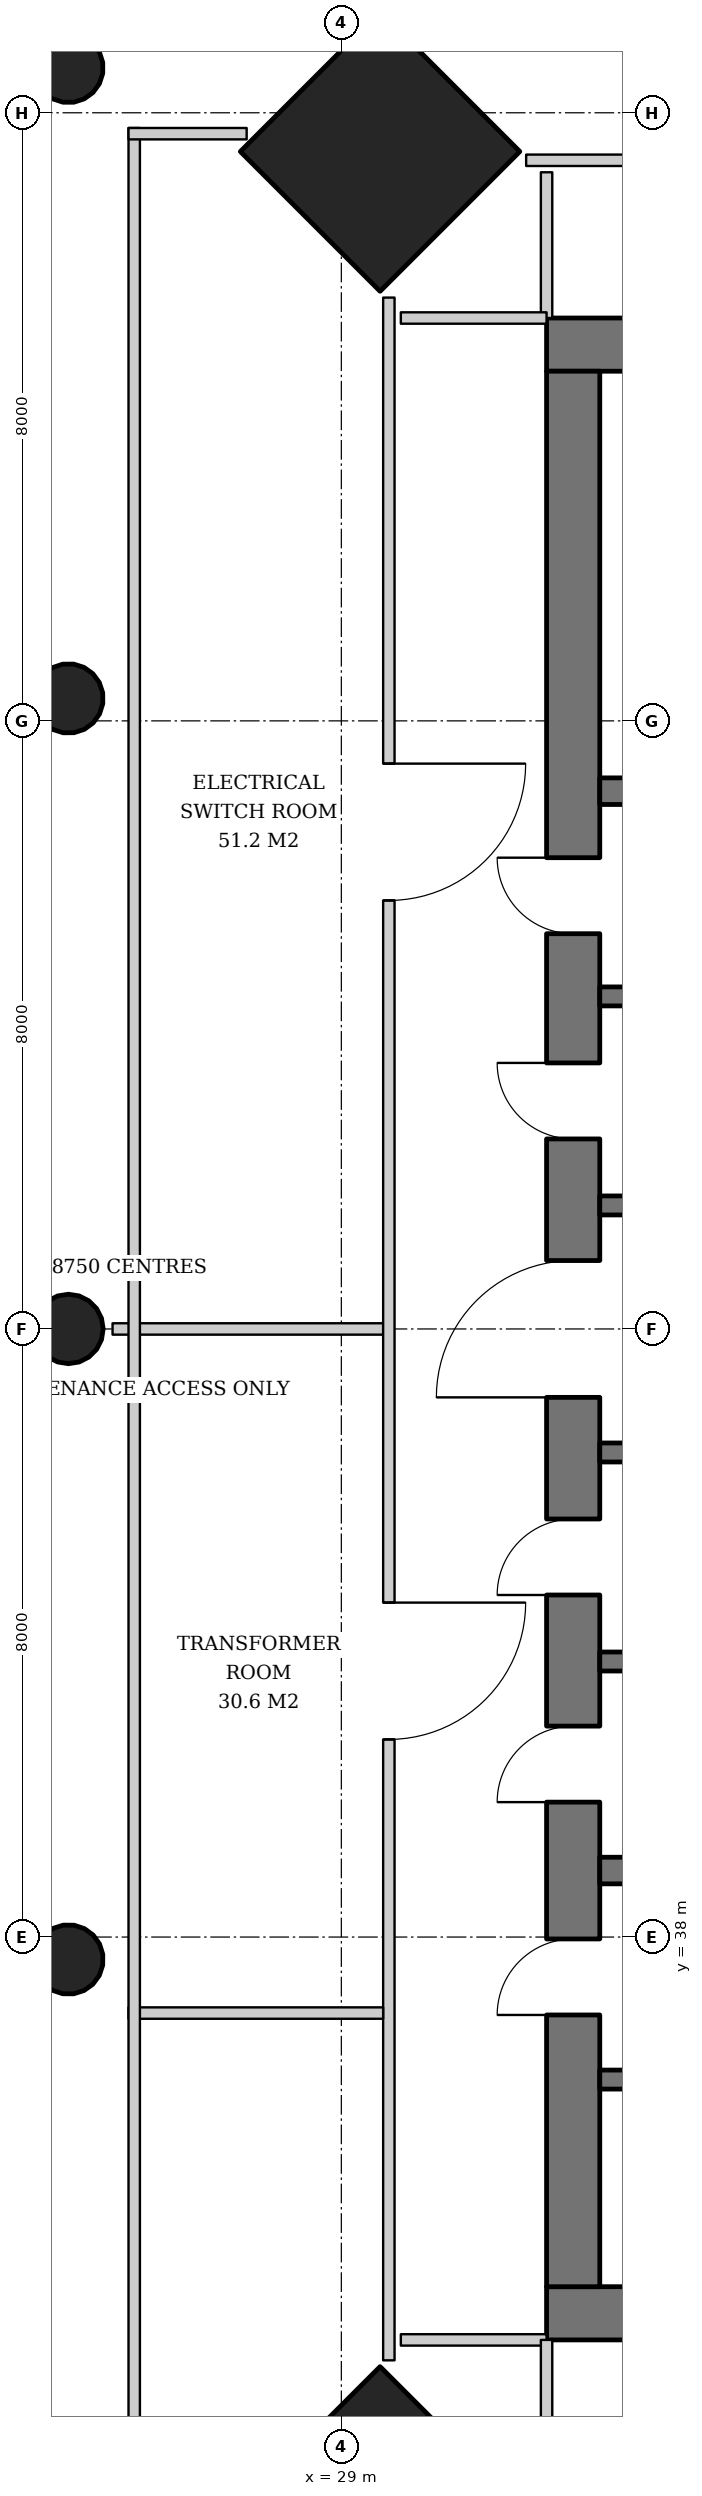
"""IFC4 building model, lengths in metres.
Left out: names, types, materials, properties, quantities, classifications, styles, units other than length and angle.
Written with IfcOpenShell. Run it as: python <this file> out.ifc"""

import sys

from ifc_helpers import new_model, si_unit, direction, frame, frame_2d, origin, origin_2d, place, context, subcontext, project, spatial, rectangle, hollow_circle, extrude, element, fill, save


model = new_model("IFC4")
c1 = context("Model", 3, precision=1e-05, world=origin(), true_north=direction((0.0, 1.0)))
c2 = subcontext(c1, "Body", "Model", "MODEL_VIEW")
j1 = project(units=[si_unit("LENGTHUNIT", "METRE"), si_unit("PLANEANGLEUNIT", "RADIAN")], contexts=[c1])
p1 = place(None, origin())
s1 = spatial("IfcSite", under=j1, at=p1, CompositionType="ELEMENT")
p2 = place(p1, origin())
s2 = spatial("IfcBuilding", under=s1, at=p2, CompositionType="ELEMENT")
p3 = place(p2, frame((0.0, 0.0, 157.8)))
s3 = spatial("IfcBuildingStorey", under=s2, at=p3, CompositionType="ELEMENT", Elevation=157.8)
for number, where, z_axis, x_axis in (
    (1, (29.471, 61.529, 0.0), (0.032, -0.032, 0.999), (0.707, 0.707, 0.0)),
    (2, (29.471, 30.471, 0.0), (0.032, 0.032, 0.999), (-0.707, 0.707, 0.0)),
):
    element("IfcColumn", number, at=place(p3, frame(where, z_axis=z_axis, x_axis=x_axis)), inside=s3, PredefinedType="COLUMN", context=c2, shape_type="SweptSolid", body=[
        extrude(rectangle(XDim=2.6, YDim=2.6, at=origin_2d()), origin(), (0.0, 0.0, 1.0), 3.804),
    ])
p4 = place(p3, frame((25.371, 62.629, 0.0), z_axis=(0.031962158256, -0.031962158256, 0.998977898093), x_axis=(0.707106781187, 0.707106781187, 0.0)))
e3 = element("IfcColumn", 3, at=p4, inside=s3, PredefinedType="COLUMN", context=c2, shape_type="SweptSolid", body=[
    extrude(hollow_circle(Radius=0.457, WallThickness=0.03, at=origin_2d()), origin(), (0.0, 0.0, 1.0), 3.804),
])
p5 = place(p3, frame((25.371, 54.314, 0.0), z_axis=(0.031974442509, -0.015923015547, 0.999361842679), x_axis=(0.445775033553, 0.895145027055, 0.0)))
e4 = element("IfcColumn", 4, at=p5, inside=s3, PredefinedType="COLUMN", context=c2, shape_type="SweptSolid", body=[
    extrude(hollow_circle(Radius=0.457, WallThickness=0.03, at=origin_2d()), origin(), (0.0, 0.0, 1.0), 3.802),
])
p6 = place(p3, frame((25.371, 46.0, 0.0), z_axis=(0.031978496719, 0.0, 0.999488557087), x_axis=(0.0, 1.0, 0.0)))
e5 = element("IfcColumn", 5, at=p6, inside=s3, PredefinedType="COLUMN", context=c2, shape_type="SweptSolid", body=[
    extrude(hollow_circle(Radius=0.457, WallThickness=0.03, at=origin_2d()), origin(), (0.0, 0.0, 1.0), 3.802),
])
p7 = place(p3, frame((25.371, 37.686, 0.0), z_axis=(0.031974442509, 0.015923015547, 0.999361842679), x_axis=(-0.445775033553, 0.895145027055, 0.0)))
e6 = element("IfcColumn", 6, at=p7, inside=s3, PredefinedType="COLUMN", context=c2, shape_type="SweptSolid", body=[
    extrude(hollow_circle(Radius=0.457, WallThickness=0.03, at=origin_2d()), origin(), (0.0, 0.0, 1.0), 3.802),
])
p8 = place(p3, frame((31.7, 33.05, 0.0), z_axis=(0.0, 0.0, 1.0), x_axis=(1.0, 0.0, 0.0)))
e7 = element("IfcWall", 7, at=p8, inside=s3, PredefinedType="SHEAR", context=c2, shape_type="SweptSolid", body=[
    extrude(rectangle(XDim=26.6, YDim=0.7, at=frame_2d((13.3, 0.0))), origin(), (0.0, 0.0, 1.0), 3.8),
])
p9 = place(p8, frame((7.3, 0.0, 0.0)))
e8 = element("IfcOpeningElement", 8, at=p9, cuts=e7, PredefinedType="OPENING", context=c2, shape_type="SweptSolid", body=[
    extrude(rectangle(XDim=1.0, YDim=2.1, at=frame_2d((0.5, 1.05))), frame((0.0, 0.36, 0.0), z_axis=(0.0, -1.0, 0.0), x_axis=(1.0, 0.0, 0.0)), (0.0, 0.0, 1.0), 0.72),
])
p10 = place(p8, frame((18.75, 0.0, 0.0)))
e9 = element("IfcOpeningElement", 9, at=p10, cuts=e7, PredefinedType="OPENING", context=c2, shape_type="SweptSolid", body=[
    extrude(rectangle(XDim=1.0, YDim=2.1, at=frame_2d((0.5, 1.05))), frame((0.0, 0.36, 0.0), z_axis=(0.0, -1.0, 0.0), x_axis=(1.0, 0.0, 0.0)), (0.0, 0.0, 1.0), 0.72),
])
p11 = place(p8, frame((1.85, 0.0, 0.0)))
e10 = element("IfcOpeningElement", 10, at=p11, cuts=e7, PredefinedType="OPENING", context=c2, shape_type="SweptSolid", body=[
    extrude(rectangle(XDim=1.0, YDim=2.1, at=frame_2d((0.5, 1.05))), frame((0.0, 0.36, 0.0), z_axis=(0.0, -1.0, 0.0), x_axis=(1.0, 0.0, 0.0)), (0.0, 0.0, 1.0), 0.72),
])
p12 = place(p8, frame((4.7, 0.0, 0.0)))
e11 = element("IfcOpeningElement", 11, at=p12, cuts=e7, PredefinedType="OPENING", context=c2, shape_type="SweptSolid", body=[
    extrude(rectangle(XDim=1.0, YDim=2.1, at=frame_2d((0.5, 1.05))), frame((0.0, 0.36, 0.0), z_axis=(0.0, -1.0, 0.0), x_axis=(1.0, 0.0, 0.0)), (0.0, 0.0, 1.0), 0.72),
])
p13 = place(p3, frame((31.7, 58.95, 0.0), z_axis=(0.0, 0.0, 1.0), x_axis=(1.0, 0.0, 0.0)))
e12 = element("IfcWall", 12, at=p13, inside=s3, PredefinedType="SHEAR", context=c2, shape_type="SweptSolid", body=[
    extrude(rectangle(XDim=26.6, YDim=0.7, at=frame_2d((13.3, 0.0))), origin(), (0.0, 0.0, 1.0), 3.8),
])
p14 = place(p13, frame((17.94, 0.0, 0.0)))
e13 = element("IfcOpeningElement", 13, at=p14, cuts=e12, PredefinedType="OPENING", context=c2, shape_type="SweptSolid", body=[
    extrude(rectangle(XDim=1.0, YDim=2.1, at=frame_2d((0.5, 1.05))), frame((0.0, 0.36, 0.0), z_axis=(0.0, -1.0, 0.0), x_axis=(1.0, 0.0, 0.0)), (0.0, 0.0, 1.0), 0.72),
])
p15 = place(p13, frame((5.825, 0.0, 0.0)))
e14 = element("IfcOpeningElement", 14, at=p15, cuts=e12, PredefinedType="OPENING", context=c2, shape_type="SweptSolid", body=[
    extrude(rectangle(XDim=1.0, YDim=2.1, at=frame_2d((0.5, 1.05))), frame((0.0, 0.36, 0.0), z_axis=(0.0, -1.0, 0.0), x_axis=(1.0, 0.0, 0.0)), (0.0, 0.0, 1.0), 0.72),
])
p16 = place(p13, frame((2.587, 0.0, 0.0)))
e15 = element("IfcOpeningElement", 15, at=p16, cuts=e12, PredefinedType="OPENING", context=c2, shape_type="SweptSolid", body=[
    extrude(rectangle(XDim=1.0, YDim=2.1, at=frame_2d((0.5, 1.05))), frame((0.0, 0.36, 0.0), z_axis=(0.0, -1.0, 0.0), x_axis=(1.0, 0.0, 0.0)), (0.0, 0.0, 1.0), 0.72),
])
p17 = place(p3, frame((32.05, 33.4, 0.0), z_axis=(0.0, 0.0, 1.0), x_axis=(0.0, 1.0, 0.0)))
e16 = element("IfcWall", 16, at=p17, inside=s3, PredefinedType="SHEAR", context=c2, shape_type="SweptSolid", body=[
    extrude(rectangle(XDim=25.2, YDim=0.7, at=frame_2d((12.6, 0.0))), origin(), (0.0, 0.0, 1.0), 3.8),
])
p18 = place(p17, frame((11.7, 0.0, 0.0)))
e17 = element("IfcOpeningElement", 17, at=p18, cuts=e16, PredefinedType="OPENING", context=c2, shape_type="SweptSolid", body=[
    extrude(rectangle(XDim=1.8, YDim=2.4, at=frame_2d((0.9, 1.2))), frame((0.0, 0.36, 0.0), z_axis=(0.0, -1.0, 0.0), x_axis=(1.0, 0.0, 0.0)), (0.0, 0.0, 1.0), 0.72),
])
p19 = place(p17, frame((3.575, 0.0, 0.0)))
e18 = element("IfcOpeningElement", 18, at=p19, cuts=e16, PredefinedType="OPENING", context=c2, shape_type="SweptSolid", body=[
    extrude(rectangle(XDim=1.0, YDim=2.1, at=frame_2d((0.5, 1.05))), frame((0.0, 0.36, 0.0), z_axis=(0.0, -1.0, 0.0), x_axis=(1.0, 0.0, 0.0)), (0.0, 0.0, 1.0), 0.72),
])
p20 = place(p17, frame((6.375, 0.0, 0.0)))
e19 = element("IfcOpeningElement", 19, at=p20, cuts=e16, PredefinedType="OPENING", context=c2, shape_type="SweptSolid", body=[
    extrude(rectangle(XDim=1.0, YDim=2.1, at=frame_2d((0.5, 1.05))), frame((0.0, 0.36, 0.0), z_axis=(0.0, -1.0, 0.0), x_axis=(1.0, 0.0, 0.0)), (0.0, 0.0, 1.0), 0.72),
])
p21 = place(p17, frame((9.1, 0.0, 0.0)))
e20 = element("IfcOpeningElement", 20, at=p21, cuts=e16, PredefinedType="OPENING", context=c2, shape_type="SweptSolid", body=[
    extrude(rectangle(XDim=1.0, YDim=2.1, at=frame_2d((0.5, 1.05))), frame((0.0, 0.36, 0.0), z_axis=(0.0, -1.0, 0.0), x_axis=(1.0, 0.0, 0.0)), (0.0, 0.0, 1.0), 0.72),
])
p22 = place(p17, frame((15.1, 0.0, 0.0)))
e21 = element("IfcOpeningElement", 21, at=p22, cuts=e16, PredefinedType="OPENING", context=c2, shape_type="SweptSolid", body=[
    extrude(rectangle(XDim=1.0, YDim=2.1, at=frame_2d((0.5, 1.05))), frame((0.0, 0.36, 0.0), z_axis=(0.0, -1.0, 0.0), x_axis=(1.0, 0.0, 0.0)), (0.0, 0.0, 1.0), 0.72),
])
p23 = place(p17, frame((17.8, 0.0, 0.0)))
e22 = element("IfcOpeningElement", 22, at=p23, cuts=e16, PredefinedType="OPENING", context=c2, shape_type="SweptSolid", body=[
    extrude(rectangle(XDim=1.0, YDim=2.1, at=frame_2d((0.5, 1.05))), frame((0.0, 0.36, 0.0), z_axis=(0.0, -1.0, 0.0), x_axis=(1.0, 0.0, 0.0)), (0.0, 0.0, 1.0), 0.72),
])
p24 = place(p3, frame((32.4, 36.125, 0.0), z_axis=(0.0, 0.0, 1.0), x_axis=(1.0, 0.0, 0.0)))
e23 = element("IfcWall", 23, at=p24, inside=s3, PredefinedType="SHEAR", context=c2, shape_type="SweptSolid", body=[
    extrude(rectangle(XDim=2.7, YDim=0.25, at=frame_2d((1.35, 0.0))), origin(), (0.0, 0.0, 1.0), 3.8),
])
p25 = place(p3, frame((32.4, 38.875, 0.0), z_axis=(0.0, 0.0, 1.0), x_axis=(1.0, 0.0, 0.0)))
e24 = element("IfcWall", 24, at=p25, inside=s3, PredefinedType="SHEAR", context=c2, shape_type="SweptSolid", body=[
    extrude(rectangle(XDim=2.7, YDim=0.35, at=frame_2d((1.35, 0.0))), origin(), (0.0, 0.0, 1.0), 3.8),
])
for number, where, z_axis, x_axis in (
    (25, (32.4, 41.625, 0.0), (0.0, 0.0, 1.0), (1.0, 0.0, 0.0)),
    (26, (32.4, 44.375, 0.0), (0.0, 0.0, 1.0), (1.0, 0.0, 0.0)),
    (27, (32.4, 47.625, 0.0), (0.0, 0.0, 1.0), (1.0, 0.0, 0.0)),
    (28, (32.4, 50.375, 0.0), (0.0, 0.0, 1.0), (1.0, 0.0, 0.0)),
):
    element("IfcWall", number, at=place(p3, frame(where, z_axis=z_axis, x_axis=x_axis)), inside=s3, PredefinedType="SHEAR", context=c2, shape_type="SweptSolid", body=[
        extrude(rectangle(XDim=2.7, YDim=0.25, at=frame_2d((1.35, 0.0))), origin(), (0.0, 0.0, 1.0), 3.8),
    ])
p26 = place(p3, frame((32.4, 53.075, 0.0), z_axis=(0.0, 0.0, 1.0), x_axis=(1.0, 0.0, 0.0)))
e29 = element("IfcWall", 29, at=p26, inside=s3, PredefinedType="SHEAR", context=c2, shape_type="SweptSolid", body=[
    extrude(rectangle(XDim=2.7, YDim=0.35, at=frame_2d((1.35, 0.0))), origin(), (0.0, 0.0, 1.0), 3.8),
])
p27 = place(p3, frame((31.7, 59.3, 0.0), z_axis=(0.0, 0.0, 1.0), x_axis=(0.0, 1.0, 0.0)))
e30 = element("IfcWall", 30, at=p27, inside=s3, PredefinedType="PARTITIONING", context=c2, shape_type="SweptSolid", body=[
    extrude(rectangle(XDim=1.917, YDim=0.15, at=frame_2d((0.958, 0.0))), origin(), (0.0, 0.0, 1.0), 3.52),
])
p28 = place(p3, frame((58.569, 61.375, 0.0), z_axis=(0.0, 0.0, 1.0), x_axis=(-1.0, 0.0, 0.0)))
e31 = element("IfcWall", 31, at=p28, inside=s3, PredefinedType="SOLIDWALL", context=c2, shape_type="SweptSolid", body=[
    extrude(rectangle(XDim=27.137, YDim=0.15, at=frame_2d((13.569, 0.0))), origin(), (0.0, 0.0, 1.0), 2.706),
])
p29 = place(p28, frame((6.131, 0.0, 0.0)))
e32 = element("IfcOpeningElement", 32, at=p29, cuts=e31, PredefinedType="OPENING", context=c2, shape_type="SweptSolid", body=[
    extrude(rectangle(XDim=1.8, YDim=2.4, at=frame_2d((0.9, 1.2))), frame((0.0, 0.085, 0.0), z_axis=(0.0, -1.0, 0.0), x_axis=(1.0, 0.0, 0.0)), (0.0, 0.0, 1.0), 0.17),
])
p30 = place(p28, frame((17.169, 0.0, 0.0)))
e33 = element("IfcOpeningElement", 33, at=p30, cuts=e31, PredefinedType="OPENING", context=c2, shape_type="SweptSolid", body=[
    extrude(rectangle(XDim=1.8, YDim=2.4, at=frame_2d((0.9, 1.2))), frame((0.0, 0.085, 0.0), z_axis=(0.0, -1.0, 0.0), x_axis=(1.0, 0.0, 0.0)), (0.0, 0.0, 1.0), 0.17),
])
for number, where, z_axis, x_axis in (
    (34, (31.7, 32.7, 0.0), (0.0, 0.0, 1.0), (-1.0, 0.0, 0.0)),
    (35, (31.7, 59.3, 0.0), (0.0, 0.0, 1.0), (-1.0, 0.0, 0.0)),
):
    element("IfcWall", number, at=place(p3, frame(where, z_axis=z_axis, x_axis=x_axis)), inside=s3, PredefinedType="PARTITIONING", context=c2, shape_type="SweptSolid", body=[
        extrude(rectangle(XDim=1.917, YDim=0.15, at=frame_2d((0.958, 0.0))), origin(), (0.0, 0.0, 1.0), 3.52),
    ])
p31 = place(p3, frame((29.55, 46.0, 0.0), z_axis=(0.0, 0.0, 1.0), x_axis=(-1.0, 0.0, 0.0)))
e36 = element("IfcWall", 36, at=p31, inside=s3, PredefinedType="SOLIDWALL", context=c2, shape_type="SweptSolid", body=[
    extrude(rectangle(XDim=3.56, YDim=0.15, at=frame_2d((1.78, 0.0))), origin(), (0.0, 0.0, 1.0), 3.52),
])
p32 = place(p3, frame((29.625, 59.569, 0.0), z_axis=(0.0, 0.0, 1.0), x_axis=(0.0, -1.0, 0.0)))
e37 = element("IfcWall", 37, at=p32, inside=s3, PredefinedType="SOLIDWALL", context=c2, shape_type="SweptSolid", body=[
    extrude(rectangle(XDim=27.137, YDim=0.15, at=frame_2d((13.569, 0.0))), origin(), (0.0, 0.0, 1.0), 2.706),
])
p33 = place(p32, frame((6.131, 0.0, 0.0)))
e38 = element("IfcOpeningElement", 38, at=p33, cuts=e37, PredefinedType="OPENING", context=c2, shape_type="SweptSolid", body=[
    extrude(rectangle(XDim=1.8, YDim=2.4, at=frame_2d((0.9, 1.2))), frame((0.0, 0.085, 0.0), z_axis=(0.0, -1.0, 0.0), x_axis=(1.0, 0.0, 0.0)), (0.0, 0.0, 1.0), 0.17),
])
p34 = place(p32, frame((17.169, 0.0, 0.0)))
e39 = element("IfcOpeningElement", 39, at=p34, cuts=e37, PredefinedType="OPENING", context=c2, shape_type="SweptSolid", body=[
    extrude(rectangle(XDim=1.8, YDim=2.4, at=frame_2d((0.9, 1.2))), frame((0.0, 0.085, 0.0), z_axis=(0.0, -1.0, 0.0), x_axis=(1.0, 0.0, 0.0)), (0.0, 0.0, 1.0), 0.17),
])
p35 = place(p3, frame((29.55, 37.0, 0.0), z_axis=(0.0, 0.0, 1.0), x_axis=(-1.0, 0.0, 0.0)))
e40 = element("IfcWall", 40, at=p35, inside=s3, PredefinedType="SOLIDWALL", context=c2, shape_type="SweptSolid", body=[
    extrude(rectangle(XDim=3.35, YDim=0.15, at=frame_2d((1.675, 0.0))), origin(), (0.0, 0.0, 1.0), 3.52),
])
p36 = place(p3, frame((31.7, 32.7, 0.0), z_axis=(0.0, 0.0, 1.0), x_axis=(0.0, -1.0, 0.0)))
e41 = element("IfcWall", 41, at=p36, inside=s3, PredefinedType="PARTITIONING", context=c2, shape_type="SweptSolid", body=[
    extrude(rectangle(XDim=1.917, YDim=0.15, at=frame_2d((0.958, 0.0))), origin(), (0.0, 0.0, 1.0), 3.52),
])
p37 = place(p3, frame((26.275, 30.2, 0.0), z_axis=(0.0, 0.0, 1.0), x_axis=(0.0, 1.0, 0.0)))
e42 = element("IfcWall", 42, at=p37, inside=s3, PredefinedType="PARTITIONING", context=c2, shape_type="SweptSolid", body=[
    extrude(rectangle(XDim=31.6, YDim=0.15, at=frame_2d((15.8, 0.0))), origin(), (0.0, 0.0, 1.0), 2.706),
])
p38 = place(p3, frame((26.2, 61.725, 0.0), z_axis=(0.0, 0.0, 1.0), x_axis=(1.0, 0.0, 0.0)))
e43 = element("IfcWall", 43, at=p38, inside=s3, PredefinedType="PARTITIONING", context=c2, shape_type="SweptSolid", body=[
    extrude(rectangle(XDim=1.554, YDim=0.15, at=frame_2d((0.777, 0.0))), origin(), (0.0, 0.0, 1.0), 2.92),
])
p39 = place(p18, origin())
e44 = element("IfcDoor", 44, at=p39, inside=s3, OperationType="DOUBLE_DOOR_SINGLE_SWING", PredefinedType="DOOR", context=c2, shape_type="SweptSolid", body=[
    extrude(rectangle(XDim=1.8, YDim=2.4, at=frame_2d((0.9, 1.2))), frame((0.0, 0.025, 0.0), z_axis=(0.0, -1.0, 0.0), x_axis=(1.0, 0.0, 0.0)), (0.0, 0.0, 1.0), 0.05),
])
fill(e17, e44)
p40 = place(p19, origin())
e45 = element("IfcDoor", 45, at=p40, inside=s3, OperationType="SINGLE_SWING_LEFT", PredefinedType="DOOR", context=c2, shape_type="SweptSolid", body=[
    extrude(rectangle(XDim=1.0, YDim=2.1, at=frame_2d((0.5, 1.05))), frame((0.0, -0.29, 0.0), z_axis=(0.0, -1.0, 0.0), x_axis=(1.0, 0.0, 0.0)), (0.0, 0.0, 1.0), 0.05),
])
fill(e18, e45)
p41 = place(p20, origin())
e46 = element("IfcDoor", 46, at=p41, inside=s3, OperationType="SINGLE_SWING_LEFT", PredefinedType="DOOR", context=c2, shape_type="SweptSolid", body=[
    extrude(rectangle(XDim=1.0, YDim=2.1, at=frame_2d((0.5, 1.05))), frame((0.0, -0.29, 0.0), z_axis=(0.0, -1.0, 0.0), x_axis=(1.0, 0.0, 0.0)), (0.0, 0.0, 1.0), 0.05),
])
fill(e19, e46)
p42 = place(p21, origin())
e47 = element("IfcDoor", 47, at=p42, inside=s3, OperationType="SINGLE_SWING_LEFT", PredefinedType="DOOR", context=c2, shape_type="SweptSolid", body=[
    extrude(rectangle(XDim=1.0, YDim=2.1, at=frame_2d((0.5, 1.05))), frame((0.0, -0.29, 0.0), z_axis=(0.0, -1.0, 0.0), x_axis=(1.0, 0.0, 0.0)), (0.0, 0.0, 1.0), 0.05),
])
fill(e20, e47)
p43 = place(p22, origin())
e48 = element("IfcDoor", 48, at=p43, inside=s3, OperationType="SINGLE_SWING_RIGHT", PredefinedType="DOOR", context=c2, shape_type="SweptSolid", body=[
    extrude(rectangle(XDim=1.0, YDim=2.1, at=frame_2d((0.5, 1.05))), frame((0.0, -0.29, 0.0), z_axis=(0.0, -1.0, 0.0), x_axis=(1.0, 0.0, 0.0)), (0.0, 0.0, 1.0), 0.05),
])
fill(e21, e48)
p44 = place(p23, origin())
e49 = element("IfcDoor", 49, at=p44, inside=s3, OperationType="SINGLE_SWING_RIGHT", PredefinedType="DOOR", context=c2, shape_type="SweptSolid", body=[
    extrude(rectangle(XDim=1.0, YDim=2.1, at=frame_2d((0.5, 1.05))), frame((0.0, -0.29, 0.0), z_axis=(0.0, -1.0, 0.0), x_axis=(1.0, 0.0, 0.0)), (0.0, 0.0, 1.0), 0.05),
])
fill(e22, e49)
p45 = place(p33, origin())
e50 = element("IfcDoor", 50, at=p45, inside=s3, OperationType="DOUBLE_DOOR_SINGLE_SWING", PredefinedType="DOOR", context=c2, shape_type="SweptSolid", body=[
    extrude(rectangle(XDim=1.8, YDim=2.4, at=frame_2d((0.9, 1.2))), frame((0.0, 0.025, 0.0), z_axis=(0.0, -1.0, 0.0), x_axis=(1.0, 0.0, 0.0)), (0.0, 0.0, 1.0), 0.05),
])
fill(e38, e50)
p46 = place(p34, origin())
e51 = element("IfcDoor", 51, at=p46, inside=s3, OperationType="DOUBLE_DOOR_SINGLE_SWING", PredefinedType="DOOR", context=c2, shape_type="SweptSolid", body=[
    extrude(rectangle(XDim=1.8, YDim=2.4, at=frame_2d((0.9, 1.2))), frame((0.0, 0.025, 0.0), z_axis=(0.0, -1.0, 0.0), x_axis=(1.0, 0.0, 0.0)), (0.0, 0.0, 1.0), 0.05),
])
fill(e39, e51)
save(model, sys.argv[1])
